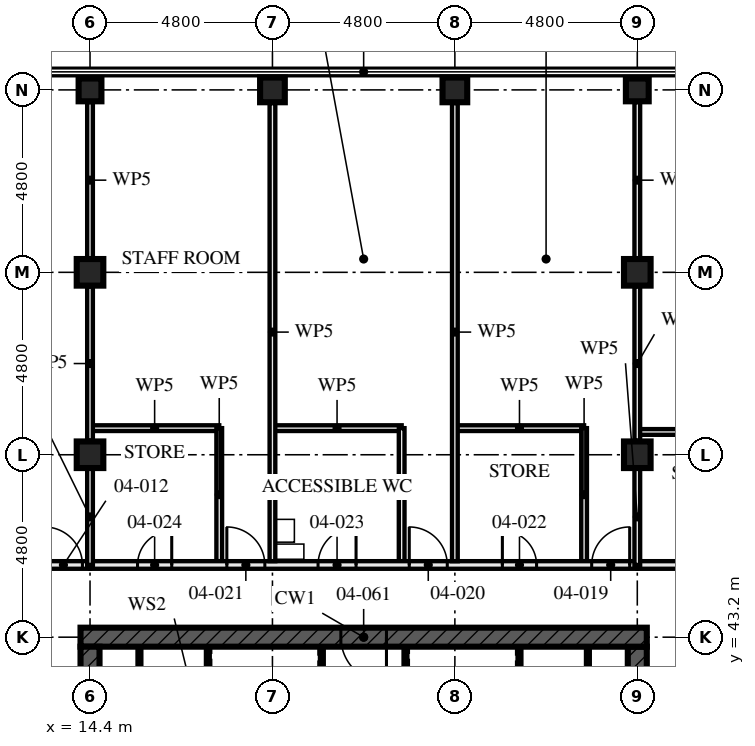
"""IFC4 building model, lengths in metres.
Left out: names, types, materials, properties, quantities, classifications, styles, units other than length and angle.
Written with IfcOpenShell. Run it as: python <this file> out.ifc"""

import sys

from ifc_helpers import new_model, si_unit, direction, frame, frame_2d, origin, origin_2d, place, context, subcontext, project, spatial, rectangle, hollow_rectangle, extrude, element, fill, save


model = new_model("IFC4")
c1 = context("Model", 3, precision=1e-05, world=origin(), true_north=direction((0.0, 1.0)))
c2 = subcontext(c1, "Body", "Model", "MODEL_VIEW")
j1 = project(units=[si_unit("LENGTHUNIT", "METRE"), si_unit("PLANEANGLEUNIT", "RADIAN")], contexts=[c1])
p1 = place(None, origin())
s1 = spatial("IfcSite", under=j1, at=p1, CompositionType="ELEMENT")
p2 = place(p1, origin())
s2 = spatial("IfcBuilding", under=s1, at=p2, CompositionType="ELEMENT")
p3 = place(p2, frame((0.0, 0.0, 18.0)))
s3 = spatial("IfcBuildingStorey", under=s2, at=p3, CompositionType="ELEMENT", Elevation=18.0)
for number, where, z_axis, x_axis in (
    (1, (14.4, 48.0, 0.0), (0.0, 0.0, 1.0), (1.0, 0.0, 0.0)),
    (2, (14.4, 52.8, 0.0), (0.0, 0.0, 1.0), (1.0, 0.0, 0.0)),
):
    element("IfcColumn", number, at=place(p3, frame(where, z_axis=z_axis, x_axis=x_axis)), inside=s3, PredefinedType="COLUMN", context=c2, shape_type="SweptSolid", body=[
        extrude(hollow_rectangle(XDim=0.7, YDim=0.7, WallThickness=0.06, at=origin_2d()), origin(), (0.0, 0.0, 1.0), 4.5),
    ])
p4 = place(p3, frame((14.4, 57.6, 0.0), z_axis=(0.0, 0.0, 1.0), x_axis=(0.0, 1.0, 0.0)))
e3 = element("IfcColumn", 3, at=p4, inside=s3, PredefinedType="COLUMN", context=c2, shape_type="SweptSolid", body=[
    extrude(hollow_rectangle(XDim=0.6, YDim=0.6, WallThickness=0.08, at=origin_2d()), origin(), (0.0, 0.0, 1.0), 4.5),
])
for number, where, z_axis, x_axis in (
    (4, (19.2, 57.6, 0.0), (0.0, 0.0, 1.0), (0.0, 1.0, 0.0)),
    (5, (24.0, 57.6, 0.0), (0.0, 0.0, 1.0), (0.0, 1.0, 0.0)),
):
    element("IfcColumn", number, at=place(p3, frame(where, z_axis=z_axis, x_axis=x_axis)), inside=s3, PredefinedType="COLUMN", context=c2, shape_type="SweptSolid", body=[
        extrude(hollow_rectangle(XDim=0.65, YDim=0.65, WallThickness=0.08, at=origin_2d()), origin(), (0.0, 0.0, 1.0), 4.5),
    ])
for number, where, z_axis, x_axis in (
    (6, (28.8, 48.0, 0.0), (0.0, 0.0, 1.0), (1.0, 0.0, 0.0)),
    (7, (28.8, 52.8, 0.0), (0.0, 0.0, 1.0), (1.0, 0.0, 0.0)),
):
    element("IfcColumn", number, at=place(p3, frame(where, z_axis=z_axis, x_axis=x_axis)), inside=s3, PredefinedType="COLUMN", context=c2, shape_type="SweptSolid", body=[
        extrude(hollow_rectangle(XDim=0.7, YDim=0.7, WallThickness=0.06, at=origin_2d()), origin(), (0.0, 0.0, 1.0), 4.5),
    ])
p5 = place(p3, frame((28.8, 57.6, 0.0), z_axis=(0.0, 0.0, 1.0), x_axis=(0.0, 1.0, 0.0)))
e8 = element("IfcColumn", 8, at=p5, inside=s3, PredefinedType="COLUMN", context=c2, shape_type="SweptSolid", body=[
    extrude(hollow_rectangle(XDim=0.6, YDim=0.6, WallThickness=0.08, at=origin_2d()), origin(), (0.0, 0.0, 1.0), 4.5),
])
p6 = place(p3, frame((29.05, 43.2, -0.17), z_axis=(0.0, 0.0, 1.0), x_axis=(-1.0, 0.0, 0.0)))
e9 = element("IfcWall", 9, at=p6, inside=s3, PredefinedType="SHEAR", context=c2, shape_type="SweptSolid", body=[
    extrude(rectangle(XDim=14.9, YDim=0.5, at=frame_2d((7.45, 0.0))), origin(), (0.0, 0.0, 1.0), 4.5),
])
p7 = place(p6, frame((6.85, 0.0, 0.17)))
e10 = element("IfcOpeningElement", 10, at=p7, cuts=e9, PredefinedType="OPENING", context=c2, shape_type="SweptSolid", body=[
    extrude(rectangle(XDim=1.2, YDim=2.1, at=frame_2d((0.6, 1.05))), frame((0.0, 0.26, 0.0), z_axis=(0.0, -1.0, 0.0), x_axis=(1.0, 0.0, 0.0)), (0.0, 0.0, 1.0), 0.521),
])
p8 = place(p3, frame((14.4, 42.95, -0.17), z_axis=(0.0, 0.0, 1.0), x_axis=(0.0, -1.0, 0.0)))
e11 = element("IfcWall", 11, at=p8, inside=s3, PredefinedType="SHEAR", context=c2, shape_type="SweptSolid", body=[
    extrude(rectangle(XDim=13.9, YDim=0.5, at=frame_2d((6.95, 0.0))), origin(), (0.0, 0.0, 1.0), 4.5),
])
p9 = place(p8, frame((6.35, 0.0, 0.17)))
e12 = element("IfcOpeningElement", 12, at=p9, cuts=e11, PredefinedType="OPENING", context=c2, shape_type="SweptSolid", body=[
    extrude(rectangle(XDim=1.2, YDim=2.1, at=frame_2d((0.6, 1.05))), frame((0.0, 0.26, 0.0), z_axis=(0.0, -1.0, 0.0), x_axis=(1.0, 0.0, 0.0)), (0.0, 0.0, 1.0), 0.521),
])
p10 = place(p3, frame((28.8, 29.05, -0.17), z_axis=(0.0, 0.0, 1.0), x_axis=(0.0, 1.0, 0.0)))
e13 = element("IfcWall", 13, at=p10, inside=s3, PredefinedType="SHEAR", context=c2, shape_type="SweptSolid", body=[
    extrude(rectangle(XDim=13.9, YDim=0.5, at=frame_2d((6.95, 0.0))), origin(), (0.0, 0.0, 1.0), 4.5),
])
p11 = place(p10, frame((6.35, 0.0, 0.17)))
e14 = element("IfcOpeningElement", 14, at=p11, cuts=e13, PredefinedType="OPENING", context=c2, shape_type="SweptSolid", body=[
    extrude(rectangle(XDim=1.2, YDim=2.1, at=frame_2d((0.6, 1.05))), frame((0.0, 0.26, 0.0), z_axis=(0.0, -1.0, 0.0), x_axis=(1.0, 0.0, 0.0)), (0.0, 0.0, 1.0), 0.521),
])
p12 = place(p3, frame((14.4, 45.1, 0.0), z_axis=(0.0, 0.0, 1.0), x_axis=(-1.0, 0.0, 0.0)))
e15 = element("IfcWall", 15, at=p12, inside=s3, PredefinedType="PARTITIONING", context=c2, shape_type="SweptSolid", body=[
    extrude(rectangle(XDim=14.855, YDim=0.2, at=frame_2d((7.427, 0.0))), origin(), (0.0, 0.0, 1.0), 3.32),
])
p13 = place(p12, frame((0.2, 0.0, 0.0)))
e16 = element("IfcOpeningElement", 16, at=p13, cuts=e15, PredefinedType="OPENING", context=c2, shape_type="SweptSolid", body=[
    extrude(rectangle(XDim=1.0, YDim=2.4, at=frame_2d((0.5, 1.2))), frame((0.0, 0.111, 0.0), z_axis=(0.0, -1.0, 0.0), x_axis=(1.0, 0.0, 0.0)), (0.0, 0.0, 1.0), 0.221),
])
p14 = place(p12, frame((5.0, 0.0, 0.0)))
e17 = element("IfcOpeningElement", 17, at=p14, cuts=e15, PredefinedType="OPENING", context=c2, shape_type="SweptSolid", body=[
    extrude(rectangle(XDim=1.0, YDim=2.4, at=frame_2d((0.5, 1.2))), frame((0.0, 0.111, 0.0), z_axis=(0.0, -1.0, 0.0), x_axis=(1.0, 0.0, 0.0)), (0.0, 0.0, 1.0), 0.221),
])
p15 = place(p12, frame((9.8, 0.0, 0.0)))
e18 = element("IfcOpeningElement", 18, at=p15, cuts=e15, PredefinedType="OPENING", context=c2, shape_type="SweptSolid", body=[
    extrude(rectangle(XDim=1.0, YDim=2.4, at=frame_2d((0.5, 1.2))), frame((0.0, 0.111, 0.0), z_axis=(0.0, -1.0, 0.0), x_axis=(1.0, 0.0, 0.0)), (0.0, 0.0, 1.0), 0.221),
])
p16 = place(p12, frame((2.65, 0.0, 0.0)))
e19 = element("IfcOpeningElement", 19, at=p16, cuts=e15, PredefinedType="OPENING", context=c2, shape_type="SweptSolid", body=[
    extrude(rectangle(XDim=0.9, YDim=2.1, at=frame_2d((0.45, 1.05))), frame((0.0, 0.111, 0.0), z_axis=(0.0, -1.0, 0.0), x_axis=(1.0, 0.0, 0.0)), (0.0, 0.0, 1.0), 0.221),
])
p17 = place(p12, frame((7.4, 0.0, 0.0)))
e20 = element("IfcOpeningElement", 20, at=p17, cuts=e15, PredefinedType="OPENING", context=c2, shape_type="SweptSolid", body=[
    extrude(rectangle(XDim=1.0, YDim=2.1, at=frame_2d((0.5, 1.05))), frame((0.0, 0.111, 0.0), z_axis=(0.0, -1.0, 0.0), x_axis=(1.0, 0.0, 0.0)), (0.0, 0.0, 1.0), 0.221),
])
p18 = place(p12, frame((12.25, 0.0, 0.0)))
e21 = element("IfcOpeningElement", 21, at=p18, cuts=e15, PredefinedType="OPENING", context=c2, shape_type="SweptSolid", body=[
    extrude(rectangle(XDim=0.9, YDim=2.1, at=frame_2d((0.45, 1.05))), frame((0.0, 0.111, 0.0), z_axis=(0.0, -1.0, 0.0), x_axis=(1.0, 0.0, 0.0)), (0.0, 0.0, 1.0), 0.221),
])
p19 = place(p3, frame((27.4, 48.7, 0.0), z_axis=(0.0, 0.0, 1.0), x_axis=(0.0, -1.0, 0.0)))
e22 = element("IfcWall", 22, at=p19, inside=s3, PredefinedType="PARTITIONING", context=c2, shape_type="SweptSolid", body=[
    extrude(rectangle(XDim=3.5, YDim=0.15, at=frame_2d((1.75, 0.0))), origin(), (0.0, 0.0, 1.0), 3.55),
])
p20 = place(p3, frame((27.4, 48.7, 0.0), z_axis=(0.0, 0.0, 1.0), x_axis=(-1.0, 0.0, 0.0)))
e23 = element("IfcWall", 23, at=p20, inside=s3, PredefinedType="PARTITIONING", context=c2, shape_type="SweptSolid", body=[
    extrude(rectangle(XDim=3.4, YDim=0.15, at=frame_2d((1.7, 0.0))), origin(), (0.0, 0.0, 1.0), 4.33),
])
p21 = place(p3, frame((22.6, 48.7, 0.0), z_axis=(0.0, 0.0, 1.0), x_axis=(0.0, -1.0, 0.0)))
e24 = element("IfcWall", 24, at=p21, inside=s3, PredefinedType="PARTITIONING", context=c2, shape_type="SweptSolid", body=[
    extrude(rectangle(XDim=3.5, YDim=0.15, at=frame_2d((1.75, 0.0))), origin(), (0.0, 0.0, 1.0), 3.55),
])
p22 = place(p3, frame((22.6, 48.7, 0.0), z_axis=(0.0, 0.0, 1.0), x_axis=(-1.0, 0.0, 0.0)))
e25 = element("IfcWall", 25, at=p22, inside=s3, PredefinedType="PARTITIONING", context=c2, shape_type="SweptSolid", body=[
    extrude(rectangle(XDim=3.4, YDim=0.15, at=frame_2d((1.7, 0.0))), origin(), (0.0, 0.0, 1.0), 4.33),
])
p23 = place(p3, frame((17.8, 48.7, 0.0), z_axis=(0.0, 0.0, 1.0), x_axis=(0.0, -1.0, 0.0)))
e26 = element("IfcWall", 26, at=p23, inside=s3, PredefinedType="PARTITIONING", context=c2, shape_type="SweptSolid", body=[
    extrude(rectangle(XDim=3.5, YDim=0.15, at=frame_2d((1.75, 0.0))), origin(), (0.0, 0.0, 1.0), 3.55),
])
p24 = place(p3, frame((17.8, 48.7, 0.0), z_axis=(0.0, 0.0, 1.0), x_axis=(-1.0, 0.0, 0.0)))
e27 = element("IfcWall", 27, at=p24, inside=s3, PredefinedType="PARTITIONING", context=c2, shape_type="SweptSolid", body=[
    extrude(rectangle(XDim=3.4, YDim=0.15, at=frame_2d((1.7, 0.0))), origin(), (0.0, 0.0, 1.0), 4.33),
])
for number, where, z_axis, x_axis in (
    (28, (24.0, 57.255, 0.0), (0.0, 0.0, 1.0), (0.0, -1.0, 0.0)),
    (29, (19.2, 57.255, 0.0), (0.0, 0.0, 1.0), (0.0, -1.0, 0.0)),
):
    element("IfcWall", number, at=place(p3, frame(where, z_axis=z_axis, x_axis=x_axis)), inside=s3, PredefinedType="PARTITIONING", context=c2, shape_type="SweptSolid", body=[
        extrude(rectangle(XDim=12.055, YDim=0.15, at=frame_2d((6.027, 0.0))), origin(), (0.0, 0.0, 1.0), 3.55),
    ])
p25 = place(p3, frame((28.8, 45.1, 0.0), z_axis=(0.0, 0.0, 1.0), x_axis=(-1.0, 0.0, 0.0)))
e30 = element("IfcWall", 30, at=p25, inside=s3, PredefinedType="PARTITIONING", context=c2, shape_type="SweptSolid", body=[
    extrude(rectangle(XDim=14.4, YDim=0.2, at=frame_2d((7.2, 0.0))), origin(), (0.0, 0.0, 1.0), 4.33),
])
p26 = place(p25, frame((0.2, 0.0, 0.0)))
e31 = element("IfcOpeningElement", 31, at=p26, cuts=e30, PredefinedType="OPENING", context=c2, shape_type="SweptSolid", body=[
    extrude(rectangle(XDim=1.0, YDim=2.4, at=frame_2d((0.5, 1.2))), frame((0.0, 0.111, 0.0), z_axis=(0.0, -1.0, 0.0), x_axis=(1.0, 0.0, 0.0)), (0.0, 0.0, 1.0), 0.221),
])
p27 = place(p25, frame((5.0, 0.0, 0.0)))
e32 = element("IfcOpeningElement", 32, at=p27, cuts=e30, PredefinedType="OPENING", context=c2, shape_type="SweptSolid", body=[
    extrude(rectangle(XDim=1.0, YDim=2.4, at=frame_2d((0.5, 1.2))), frame((0.0, 0.111, 0.0), z_axis=(0.0, -1.0, 0.0), x_axis=(1.0, 0.0, 0.0)), (0.0, 0.0, 1.0), 0.221),
])
p28 = place(p25, frame((9.8, 0.0, 0.0)))
e33 = element("IfcOpeningElement", 33, at=p28, cuts=e30, PredefinedType="OPENING", context=c2, shape_type="SweptSolid", body=[
    extrude(rectangle(XDim=1.0, YDim=2.4, at=frame_2d((0.5, 1.2))), frame((0.0, 0.111, 0.0), z_axis=(0.0, -1.0, 0.0), x_axis=(1.0, 0.0, 0.0)), (0.0, 0.0, 1.0), 0.221),
])
p29 = place(p25, frame((2.65, 0.0, 0.0)))
e34 = element("IfcOpeningElement", 34, at=p29, cuts=e30, PredefinedType="OPENING", context=c2, shape_type="SweptSolid", body=[
    extrude(rectangle(XDim=0.9, YDim=2.1, at=frame_2d((0.45, 1.05))), frame((0.0, 0.111, 0.0), z_axis=(0.0, -1.0, 0.0), x_axis=(1.0, 0.0, 0.0)), (0.0, 0.0, 1.0), 0.221),
])
p30 = place(p25, frame((7.4, 0.0, 0.0)))
e35 = element("IfcOpeningElement", 35, at=p30, cuts=e30, PredefinedType="OPENING", context=c2, shape_type="SweptSolid", body=[
    extrude(rectangle(XDim=1.0, YDim=2.1, at=frame_2d((0.5, 1.05))), frame((0.0, 0.111, 0.0), z_axis=(0.0, -1.0, 0.0), x_axis=(1.0, 0.0, 0.0)), (0.0, 0.0, 1.0), 0.221),
])
p31 = place(p25, frame((12.25, 0.0, 0.0)))
e36 = element("IfcOpeningElement", 36, at=p31, cuts=e30, PredefinedType="OPENING", context=c2, shape_type="SweptSolid", body=[
    extrude(rectangle(XDim=0.9, YDim=2.1, at=frame_2d((0.45, 1.05))), frame((0.0, 0.111, 0.0), z_axis=(0.0, -1.0, 0.0), x_axis=(1.0, 0.0, 0.0)), (0.0, 0.0, 1.0), 0.221),
])
p32 = place(p3, frame((32.2, 48.6, 0.0), z_axis=(0.0, 0.0, 1.0), x_axis=(-1.0, 0.0, 0.0)))
e37 = element("IfcWall", 37, at=p32, inside=s3, PredefinedType="PARTITIONING", context=c2, shape_type="SweptSolid", body=[
    extrude(rectangle(XDim=3.4, YDim=0.15, at=frame_2d((1.7, 0.0))), origin(), (0.0, 0.0, 1.0), 4.33),
])
p33 = place(p3, frame((43.655, 45.1, 0.0), z_axis=(0.0, 0.0, 1.0), x_axis=(-1.0, 0.0, 0.0)))
e38 = element("IfcWall", 38, at=p33, inside=s3, PredefinedType="PARTITIONING", context=c2, shape_type="SweptSolid", body=[
    extrude(rectangle(XDim=14.855, YDim=0.2, at=frame_2d((7.427, 0.0))), origin(), (0.0, 0.0, 1.0), 3.32),
])
p34 = place(p33, frame((0.655, 0.0, 0.0)))
e39 = element("IfcOpeningElement", 39, at=p34, cuts=e38, PredefinedType="OPENING", context=c2, shape_type="SweptSolid", body=[
    extrude(rectangle(XDim=1.0, YDim=2.4, at=frame_2d((0.5, 1.2))), frame((0.0, 0.111, 0.0), z_axis=(0.0, -1.0, 0.0), x_axis=(1.0, 0.0, 0.0)), (0.0, 0.0, 1.0), 0.221),
])
p35 = place(p33, frame((5.455, 0.0, 0.0)))
e40 = element("IfcOpeningElement", 40, at=p35, cuts=e38, PredefinedType="OPENING", context=c2, shape_type="SweptSolid", body=[
    extrude(rectangle(XDim=1.0, YDim=2.4, at=frame_2d((0.5, 1.2))), frame((0.0, 0.111, 0.0), z_axis=(0.0, -1.0, 0.0), x_axis=(1.0, 0.0, 0.0)), (0.0, 0.0, 1.0), 0.221),
])
p36 = place(p33, frame((10.255, 0.0, 0.0)))
e41 = element("IfcOpeningElement", 41, at=p36, cuts=e38, PredefinedType="OPENING", context=c2, shape_type="SweptSolid", body=[
    extrude(rectangle(XDim=1.0, YDim=2.4, at=frame_2d((0.5, 1.2))), frame((0.0, 0.111, 0.0), z_axis=(0.0, -1.0, 0.0), x_axis=(1.0, 0.0, 0.0)), (0.0, 0.0, 1.0), 0.221),
])
p37 = place(p33, frame((3.105, 0.0, 0.0)))
e42 = element("IfcOpeningElement", 42, at=p37, cuts=e38, PredefinedType="OPENING", context=c2, shape_type="SweptSolid", body=[
    extrude(rectangle(XDim=0.9, YDim=2.1, at=frame_2d((0.45, 1.05))), frame((0.0, 0.111, 0.0), z_axis=(0.0, -1.0, 0.0), x_axis=(1.0, 0.0, 0.0)), (0.0, 0.0, 1.0), 0.221),
])
p38 = place(p33, frame((7.855, 0.0, 0.0)))
e43 = element("IfcOpeningElement", 43, at=p38, cuts=e38, PredefinedType="OPENING", context=c2, shape_type="SweptSolid", body=[
    extrude(rectangle(XDim=1.0, YDim=2.1, at=frame_2d((0.5, 1.05))), frame((0.0, 0.111, 0.0), z_axis=(0.0, -1.0, 0.0), x_axis=(1.0, 0.0, 0.0)), (0.0, 0.0, 1.0), 0.221),
])
p39 = place(p33, frame((12.705, 0.0, 0.0)))
e44 = element("IfcOpeningElement", 44, at=p39, cuts=e38, PredefinedType="OPENING", context=c2, shape_type="SweptSolid", body=[
    extrude(rectangle(XDim=0.9, YDim=2.1, at=frame_2d((0.45, 1.05))), frame((0.0, 0.111, 0.0), z_axis=(0.0, -1.0, 0.0), x_axis=(1.0, 0.0, 0.0)), (0.0, 0.0, 1.0), 0.221),
])
for number, where, z_axis, x_axis in (
    (45, (15.7, 37.15, 0.0), (0.0, 0.0, 1.0), (0.0, 1.0, 0.0)),
    (46, (27.5, 37.15, 0.0), (0.0, 0.0, 1.0), (0.0, 1.0, 0.0)),
):
    element("IfcWall", number, at=place(p3, frame(where, z_axis=z_axis, x_axis=x_axis)), inside=s3, PredefinedType="SOLIDWALL", context=c2, shape_type="SweptSolid", body=[
        extrude(rectangle(XDim=5.8, YDim=0.1, at=frame_2d((2.9, 0.0))), origin(), (0.0, 0.0, 1.0), 4.33),
    ])
p40 = place(p3, frame((20.5, 37.15, 0.0), z_axis=(0.0, 0.0, 1.0), x_axis=(0.0, 1.0, 0.0)))
e47 = element("IfcWall", 47, at=p40, inside=s3, PredefinedType="SOLIDWALL", context=c2, shape_type="SweptSolid", body=[
    extrude(rectangle(XDim=5.8, YDim=0.1, at=frame_2d((2.9, 0.0))), origin(), (0.0, 0.0, 1.0), 4.33),
])
p41 = place(p40, frame((0.925, 0.0, 0.0)))
e48 = element("IfcOpeningElement", 48, at=p41, cuts=e47, PredefinedType="OPENING", context=c2, shape_type="SweptSolid", body=[
    extrude(rectangle(XDim=1.0, YDim=2.1, at=frame_2d((0.5, 1.05))), frame((0.0, 0.061, 0.0), z_axis=(0.0, -1.0, 0.0), x_axis=(1.0, 0.0, 0.0)), (0.0, 0.0, 1.0), 0.121),
])
p42 = place(p40, frame((3.9, 0.0, 0.0)))
e49 = element("IfcOpeningElement", 49, at=p42, cuts=e47, PredefinedType="OPENING", context=c2, shape_type="SweptSolid", body=[
    extrude(rectangle(XDim=1.0, YDim=2.1, at=frame_2d((0.5, 1.05))), frame((0.0, 0.061, 0.0), z_axis=(0.0, -1.0, 0.0), x_axis=(1.0, 0.0, 0.0)), (0.0, 0.0, 1.0), 0.121),
])
for number, where, z_axis, x_axis in (
    (50, (22.7, 37.15, 0.0), (0.0, 0.0, 1.0), (0.0, 1.0, 0.0)),
    (51, (17.5, 37.15, 0.0), (0.0, 0.0, 1.0), (0.0, 1.0, 0.0)),
    (52, (25.7, 37.15, 0.0), (0.0, 0.0, 1.0), (0.0, 1.0, 0.0)),
):
    element("IfcWall", number, at=place(p3, frame(where, z_axis=z_axis, x_axis=x_axis)), inside=s3, PredefinedType="SOLIDWALL", context=c2, shape_type="SweptSolid", body=[
        extrude(rectangle(XDim=5.8, YDim=0.1, at=frame_2d((2.9, 0.0))), origin(), (0.0, 0.0, 1.0), 4.33),
    ])
p43 = place(p3, frame((14.4, 45.1, 0.0), z_axis=(0.0, 0.0, 1.0), x_axis=(0.0, 1.0, 0.0)))
e53 = element("IfcWall", 53, at=p43, inside=s3, PredefinedType="PARTITIONING", context=c2, shape_type="SweptSolid", body=[
    extrude(rectangle(XDim=2.53, YDim=0.15, at=frame_2d((1.265, 0.0))), origin(), (0.0, 0.0, 1.0), 3.32),
])
p44 = place(p3, frame((14.4, 48.37, 0.0), z_axis=(0.0, 0.0, 1.0), x_axis=(0.0, 1.0, 0.0)))
e54 = element("IfcWall", 54, at=p44, inside=s3, PredefinedType="PARTITIONING", context=c2, shape_type="SweptSolid", body=[
    extrude(rectangle(XDim=4.06, YDim=0.15, at=frame_2d((2.03, 0.0))), origin(), (0.0, 0.0, 1.0), 3.32),
])
p45 = place(p3, frame((14.4, 53.17, 0.0), z_axis=(0.0, 0.0, 1.0), x_axis=(0.0, 1.0, 0.0)))
e55 = element("IfcWall", 55, at=p45, inside=s3, PredefinedType="PARTITIONING", context=c2, shape_type="SweptSolid", body=[
    extrude(rectangle(XDim=4.11, YDim=0.15, at=frame_2d((2.055, 0.0))), origin(), (0.0, 0.0, 1.0), 3.32),
])
p46 = place(p3, frame((28.8, 45.1, 0.0), z_axis=(0.0, 0.0, 1.0), x_axis=(0.0, 1.0, 0.0)))
e56 = element("IfcWall", 56, at=p46, inside=s3, PredefinedType="PARTITIONING", context=c2, shape_type="SweptSolid", body=[
    extrude(rectangle(XDim=2.53, YDim=0.15, at=frame_2d((1.265, 0.0))), origin(), (0.0, 0.0, 1.0), 3.32),
])
p47 = place(p3, frame((28.8, 48.37, 0.0), z_axis=(0.0, 0.0, 1.0), x_axis=(0.0, 1.0, 0.0)))
e57 = element("IfcWall", 57, at=p47, inside=s3, PredefinedType="PARTITIONING", context=c2, shape_type="SweptSolid", body=[
    extrude(rectangle(XDim=4.06, YDim=0.15, at=frame_2d((2.03, 0.0))), origin(), (0.0, 0.0, 1.0), 3.32),
])
p48 = place(p3, frame((28.8, 53.17, 0.0), z_axis=(0.0, 0.0, 1.0), x_axis=(0.0, 1.0, 0.0)))
e58 = element("IfcWall", 58, at=p48, inside=s3, PredefinedType="PARTITIONING", context=c2, shape_type="SweptSolid", body=[
    extrude(rectangle(XDim=4.11, YDim=0.15, at=frame_2d((2.055, 0.0))), origin(), (0.0, 0.0, 1.0), 3.32),
])
p49 = place(p13, frame((1.0, 0.0, 0.0), z_axis=(0.0, 0.0, 1.0), x_axis=(-1.0, 0.0, 0.0)))
e59 = element("IfcDoor", 59, at=p49, inside=s3, OperationType="SINGLE_SWING_RIGHT", PredefinedType="DOOR", context=c2, shape_type="SweptSolid", body=[
    extrude(rectangle(XDim=1.0, YDim=2.4, at=frame_2d((0.5, 1.2))), frame((0.0, 0.027, 0.0), z_axis=(0.0, -1.0, 0.0), x_axis=(1.0, 0.0, 0.0)), (0.0, 0.0, 1.0), 0.054),
])
fill(e16, e59)
p50 = place(p26, frame((1.0, 0.0, 0.0), z_axis=(0.0, 0.0, 1.0), x_axis=(-1.0, 0.0, 0.0)))
e60 = element("IfcDoor", 60, at=p50, inside=s3, OperationType="SINGLE_SWING_LEFT", PredefinedType="DOOR", context=c2, shape_type="SweptSolid", body=[
    extrude(rectangle(XDim=1.0, YDim=2.4, at=frame_2d((0.5, 1.2))), frame((0.0, 0.027, 0.0), z_axis=(0.0, -1.0, 0.0), x_axis=(1.0, 0.0, 0.0)), (0.0, 0.0, 1.0), 0.054),
])
fill(e31, e60)
p51 = place(p27, frame((1.0, 0.0, 0.0), z_axis=(0.0, 0.0, 1.0), x_axis=(-1.0, 0.0, 0.0)))
e61 = element("IfcDoor", 61, at=p51, inside=s3, OperationType="SINGLE_SWING_RIGHT", PredefinedType="DOOR", context=c2, shape_type="SweptSolid", body=[
    extrude(rectangle(XDim=1.0, YDim=2.4, at=frame_2d((0.5, 1.2))), frame((0.0, 0.027, 0.0), z_axis=(0.0, -1.0, 0.0), x_axis=(1.0, 0.0, 0.0)), (0.0, 0.0, 1.0), 0.054),
])
fill(e32, e61)
p52 = place(p28, frame((1.0, 0.0, 0.0), z_axis=(0.0, 0.0, 1.0), x_axis=(-1.0, 0.0, 0.0)))
e62 = element("IfcDoor", 62, at=p52, inside=s3, OperationType="SINGLE_SWING_RIGHT", PredefinedType="DOOR", context=c2, shape_type="SweptSolid", body=[
    extrude(rectangle(XDim=1.0, YDim=2.4, at=frame_2d((0.5, 1.2))), frame((0.0, 0.027, 0.0), z_axis=(0.0, -1.0, 0.0), x_axis=(1.0, 0.0, 0.0)), (0.0, 0.0, 1.0), 0.054),
])
fill(e33, e62)
p53 = place(p29, frame((0.9, 0.0, 0.0), z_axis=(0.0, 0.0, 1.0), x_axis=(-1.0, 0.0, 0.0)))
e63 = element("IfcDoor", 63, at=p53, inside=s3, OperationType="SINGLE_SWING_RIGHT", PredefinedType="DOOR", context=c2, shape_type="SweptSolid", body=[
    extrude(rectangle(XDim=0.9, YDim=2.1, at=frame_2d((0.45, 1.05))), frame((0.0, 0.027, 0.0), z_axis=(0.0, -1.0, 0.0), x_axis=(1.0, 0.0, 0.0)), (0.0, 0.0, 1.0), 0.054),
])
fill(e34, e63)
p54 = place(p30, frame((1.0, 0.0, 0.0), z_axis=(0.0, 0.0, 1.0), x_axis=(-1.0, 0.0, 0.0)))
e64 = element("IfcDoor", 64, at=p54, inside=s3, OperationType="SINGLE_SWING_LEFT", PredefinedType="DOOR", context=c2, shape_type="SweptSolid", body=[
    extrude(rectangle(XDim=1.0, YDim=2.1, at=frame_2d((0.5, 1.05))), frame((0.0, 0.027, 0.0), z_axis=(0.0, -1.0, 0.0), x_axis=(1.0, 0.0, 0.0)), (0.0, 0.0, 1.0), 0.054),
])
fill(e35, e64)
p55 = place(p31, frame((0.9, 0.0, 0.0), z_axis=(0.0, 0.0, 1.0), x_axis=(-1.0, 0.0, 0.0)))
e65 = element("IfcDoor", 65, at=p55, inside=s3, OperationType="SINGLE_SWING_LEFT", PredefinedType="DOOR", context=c2, shape_type="SweptSolid", body=[
    extrude(rectangle(XDim=0.9, YDim=2.1, at=frame_2d((0.45, 1.05))), frame((0.0, 0.027, 0.0), z_axis=(0.0, -1.0, 0.0), x_axis=(1.0, 0.0, 0.0)), (0.0, 0.0, 1.0), 0.054),
])
fill(e36, e65)
p56 = place(p7, origin())
e66 = element("IfcDoor", 66, at=p56, inside=s3, OperationType="SINGLE_SWING_LEFT", PredefinedType="DOOR", context=c2, shape_type="SweptSolid", body=[
    extrude(rectangle(XDim=1.2, YDim=2.1, at=frame_2d((0.6, 1.05))), frame((0.0, 0.027, 0.0), z_axis=(0.0, -1.0, 0.0), x_axis=(1.0, 0.0, 0.0)), (0.0, 0.0, 1.0), 0.054),
])
fill(e10, e66)
save(model, sys.argv[1])
